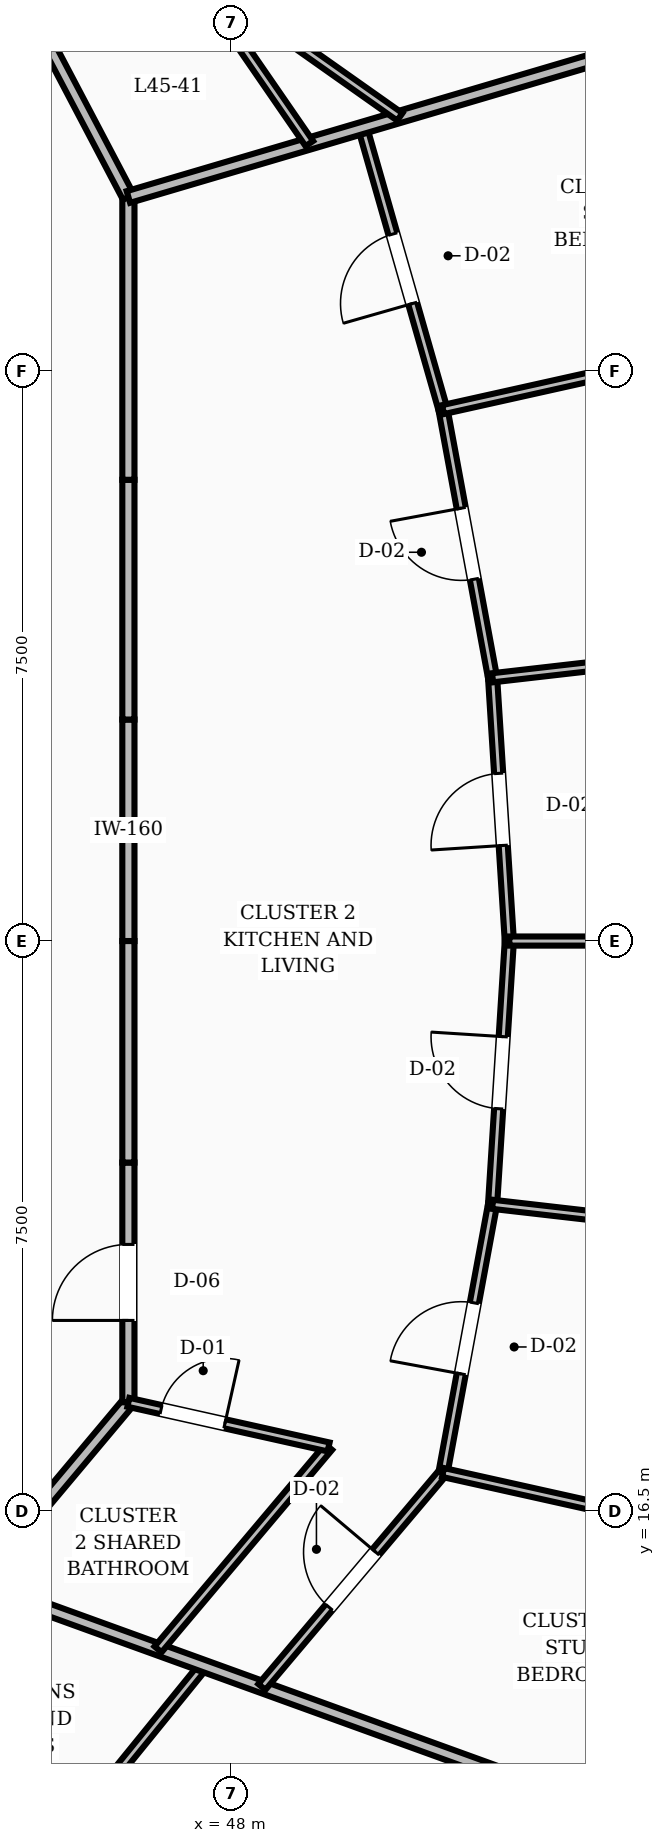
"""IFC4 building model, lengths in metres.
Left out: names, types, materials, properties, quantities, classifications, styles, units other than length and angle.
Written with IfcOpenShell. Run it as: python <this file> out.ifc"""

import sys

from ifc_helpers import new_model, si_unit, direction, frame, frame_2d, origin, place, context, subcontext, project, spatial, rectangle, extrude, element, fill, save


model = new_model("IFC4")
c1 = context("Model", 3, precision=1e-05, world=origin(), true_north=direction((0.0, 1.0)))
c2 = subcontext(c1, "Body", "Model", "MODEL_VIEW")
j1 = project(units=[si_unit("LENGTHUNIT", "METRE"), si_unit("PLANEANGLEUNIT", "RADIAN")], contexts=[c1])
p1 = place(None, origin())
s1 = spatial("IfcSite", under=j1, at=p1, CompositionType="ELEMENT")
p2 = place(p1, origin())
s2 = spatial("IfcBuilding", under=s1, at=p2, CompositionType="ELEMENT")
p3 = place(p2, frame((0.0, 0.0, 174.8)))
s3 = spatial("IfcBuildingStorey", under=s2, at=p3, CompositionType="ELEMENT", Elevation=174.8)
p4 = place(p3, frame((46.65, 24.0, 0.0), z_axis=(0.0, 0.0, 1.0), x_axis=(0.0, 1.0, 0.0)))
e1 = element("IfcWall", 1, at=p4, inside=s3, PredefinedType="SOLIDWALL", context=c2, shape_type="SweptSolid", body=[
    extrude(rectangle(XDim=2.914, YDim=0.16, at=frame_2d((1.457, 0.0))), origin(), (0.0, 0.0, 1.0), 2.8),
])
p5 = place(p3, frame((46.65, 26.914, 0.0), z_axis=(0.0, 0.0, 1.0), x_axis=(0.0, 1.0, 0.0)))
e2 = element("IfcWall", 2, at=p5, inside=s3, PredefinedType="SOLIDWALL", context=c2, shape_type="SweptSolid", body=[
    extrude(rectangle(XDim=3.154, YDim=0.16, at=frame_2d((1.577, 0.0))), origin(), (0.0, 0.0, 1.0), 2.8),
])
p6 = place(p3, frame((46.65, 30.068, 0.0), z_axis=(0.0, 0.0, 1.0), x_axis=(0.0, 1.0, 0.0)))
e3 = element("IfcWall", 3, at=p6, inside=s3, PredefinedType="SOLIDWALL", context=c2, shape_type="SweptSolid", body=[
    extrude(rectangle(XDim=3.721, YDim=0.16, at=frame_2d((1.86, 0.0))), origin(), (0.0, 0.0, 1.0), 2.8),
])
p7 = place(p3, frame((46.65, 33.789, 0.0), z_axis=(0.0, 0.0, 1.0), x_axis=(-0.46527115782, 0.885168204185, 0.0)))
e4 = element("IfcWall", 4, at=p7, inside=s3, PredefinedType="SOLIDWALL", context=c2, shape_type="SweptSolid", body=[
    extrude(rectangle(XDim=3.6, YDim=0.16, at=frame_2d((1.8, 0.0))), origin(), (0.0, 0.0, 1.0), 2.8),
])
p8 = place(p3, frame((44.65, 15.548, 0.0), z_axis=(0.0, 0.0, 1.0), x_axis=(0.642665742791, 0.76614668507, 0.0)))
e5 = element("IfcWall", 5, at=p8, inside=s3, PredefinedType="SOLIDWALL", context=c2, shape_type="SweptSolid", body=[
    extrude(rectangle(XDim=3.112, YDim=0.16, at=frame_2d((1.556, 0.0))), origin(), (0.0, 0.0, 1.0), 2.8),
])
p9 = place(p3, frame((46.65, 17.932, 0.0), z_axis=(0.0, 0.0, 1.0), x_axis=(0.0, 1.0, 0.0)))
e6 = element("IfcWall", 6, at=p9, inside=s3, PredefinedType="SOLIDWALL", context=c2, shape_type="SweptSolid", body=[
    extrude(rectangle(XDim=3.154, YDim=0.16, at=frame_2d((1.577, 0.0))), origin(), (0.0, 0.0, 1.0), 2.8),
])
p10 = place(p9, frame((1.077, 0.0, 0.0)))
e7 = element("IfcOpeningElement", 7, at=p10, cuts=e6, PredefinedType="OPENING", context=c2, shape_type="SweptSolid", body=[
    extrude(rectangle(XDim=1.0, YDim=2.1, at=frame_2d((0.5, 1.05))), frame((0.0, 0.09, 0.0), z_axis=(0.0, -1.0, 0.0), x_axis=(1.0, 0.0, 0.0)), (0.0, 0.0, 1.0), 0.18),
])
p11 = place(p3, frame((46.65, 21.086, 0.0), z_axis=(0.0, 0.0, 1.0), x_axis=(0.0, 1.0, 0.0)))
e8 = element("IfcWall", 8, at=p11, inside=s3, PredefinedType="SOLIDWALL", context=c2, shape_type="SweptSolid", body=[
    extrude(rectangle(XDim=2.914, YDim=0.16, at=frame_2d((1.457, 0.0))), origin(), (0.0, 0.0, 1.0), 2.8),
])
p12 = place(p3, frame((45.424, 11.74, 0.0), z_axis=(0.0, 0.0, 1.0), x_axis=(0.630511474319, 0.776179928079, 0.0)))
e9 = element("IfcWall", 9, at=p12, inside=s3, PredefinedType="PARTITIONING", context=c2, shape_type="SweptSolid", body=[
    extrude(rectangle(XDim=3.511, YDim=0.12, at=frame_2d((1.756, 0.0))), origin(), (0.0, 0.0, 1.0), 2.8),
])
p13 = place(p3, frame((44.65, 15.548, 0.0), z_axis=(0.0, 0.0, 1.0), x_axis=(0.940209575336, -0.340596468636, 0.0)))
e10 = element("IfcWall", 10, at=p13, inside=s3, PredefinedType="SOLIDWALL", context=c2, shape_type="SweptSolid", body=[
    extrude(rectangle(XDim=9.029, YDim=0.16, at=frame_2d((4.514, 0.0))), origin(), (0.0, 0.0, 1.0), 2.8),
])
p14 = place(p3, frame((47.04, 14.682, 0.0), z_axis=(0.0, 0.0, 1.0), x_axis=(0.644463857784, 0.764634772954, 0.0)))
e11 = element("IfcWall", 11, at=p14, inside=s3, PredefinedType="PARTITIONING", context=c2, shape_type="SweptSolid", body=[
    extrude(rectangle(XDim=3.482, YDim=0.12, at=frame_2d((1.741, 0.0))), origin(), (0.0, 0.0, 1.0), 2.8),
])
p15 = place(p3, frame((46.65, 17.932, 0.0), z_axis=(0.0, 0.0, 1.0), x_axis=(0.976010083103, -0.217725326231, 0.0)))
e12 = element("IfcWall", 12, at=p15, inside=s3, PredefinedType="PARTITIONING", context=c2, shape_type="SweptSolid", body=[
    extrude(rectangle(XDim=2.699, YDim=0.12, at=frame_2d((1.35, 0.0))), origin(), (0.0, 0.0, 1.0), 2.8),
])
p16 = place(p15, frame((0.44, 0.0, 0.0)))
e13 = element("IfcOpeningElement", 13, at=p16, cuts=e12, PredefinedType="OPENING", context=c2, shape_type="SweptSolid", body=[
    extrude(rectangle(XDim=0.86, YDim=2.1, at=frame_2d((0.43, 1.05))), frame((0.0, 0.07, 0.0), z_axis=(0.0, -1.0, 0.0), x_axis=(1.0, 0.0, 0.0)), (0.0, 0.0, 1.0), 0.14),
])
p17 = place(p3, frame((48.406, 14.187, 0.0), z_axis=(0.0, 0.0, 1.0), x_axis=(0.645325713634, 0.763907535846, 0.0)))
e14 = element("IfcWall", 14, at=p17, inside=s3, PredefinedType="PARTITIONING", context=c2, shape_type="SweptSolid", body=[
    extrude(rectangle(XDim=3.694, YDim=0.12, at=frame_2d((1.847, 0.0))), origin(), (0.0, 0.0, 1.0), 2.8),
])
p18 = place(p17, frame((1.372, 0.0, 0.0)))
e15 = element("IfcOpeningElement", 15, at=p18, cuts=e14, PredefinedType="OPENING", context=c2, shape_type="SweptSolid", body=[
    extrude(rectangle(XDim=0.95, YDim=2.1, at=frame_2d((0.475, 1.05))), frame((0.0, 0.07, 0.0), z_axis=(0.0, -1.0, 0.0), x_axis=(1.0, 0.0, 0.0)), (0.0, 0.0, 1.0), 0.14),
])
p19 = place(p3, frame((50.789, 17.009, 0.0), z_axis=(0.0, 0.0, 1.0), x_axis=(0.18176514898, 0.983341970332, 0.0)))
e16 = element("IfcWall", 16, at=p19, inside=s3, PredefinedType="PARTITIONING", context=c2, shape_type="SweptSolid", body=[
    extrude(rectangle(XDim=3.588, YDim=0.12, at=frame_2d((1.794, 0.0))), origin(), (0.0, 0.0, 1.0), 2.8),
])
p20 = place(p19, frame((1.319, 0.0, 0.0)))
e17 = element("IfcOpeningElement", 17, at=p20, cuts=e16, PredefinedType="OPENING", context=c2, shape_type="SweptSolid", body=[
    extrude(rectangle(XDim=0.95, YDim=2.1, at=frame_2d((0.475, 1.05))), frame((0.0, 0.07, 0.0), z_axis=(0.0, -1.0, 0.0), x_axis=(1.0, 0.0, 0.0)), (0.0, 0.0, 1.0), 0.14),
])
p21 = place(p3, frame((50.789, 17.009, 0.0), z_axis=(0.0, 0.0, 1.0), x_axis=(0.976023513378, -0.217665112806, 0.0)))
e18 = element("IfcWall", 18, at=p21, inside=s3, PredefinedType="PARTITIONING", context=c2, shape_type="SweptSolid", body=[
    extrude(rectangle(XDim=5.348, YDim=0.12, at=frame_2d((2.674, 0.0))), origin(), (0.0, 0.0, 1.0), 2.8),
])
p22 = place(p3, frame((51.441, 20.536, 0.0), z_axis=(0.0, 0.0, 1.0), x_axis=(0.063451217103, 0.997984941293, 0.0)))
e19 = element("IfcWall", 19, at=p22, inside=s3, PredefinedType="PARTITIONING", context=c2, shape_type="SweptSolid", body=[
    extrude(rectangle(XDim=3.471, YDim=0.12, at=frame_2d((1.735, 0.0))), origin(), (0.0, 0.0, 1.0), 2.8),
])
p23 = place(p22, frame((1.26, 0.0, 0.0)))
e20 = element("IfcOpeningElement", 20, at=p23, cuts=e19, PredefinedType="OPENING", context=c2, shape_type="SweptSolid", body=[
    extrude(rectangle(XDim=0.95, YDim=2.1, at=frame_2d((0.475, 1.05))), frame((0.0, 0.07, 0.0), z_axis=(0.0, -1.0, 0.0), x_axis=(1.0, 0.0, 0.0)), (0.0, 0.0, 1.0), 0.14),
])
p24 = place(p3, frame((51.441, 20.536, 0.0), z_axis=(0.0, 0.0, 1.0), x_axis=(0.993484761462, -0.11396503298, 0.0)))
e21 = element("IfcWall", 21, at=p24, inside=s3, PredefinedType="PARTITIONING", context=c2, shape_type="SweptSolid", body=[
    extrude(rectangle(XDim=6.088, YDim=0.12, at=frame_2d((3.044, 0.0))), origin(), (0.0, 0.0, 1.0), 2.8),
])
p25 = place(p3, frame((51.662, 24.0, 0.0), z_axis=(0.0, 0.0, 1.0), x_axis=(-0.063451217103, 0.997984941293, 0.0)))
e22 = element("IfcWall", 22, at=p25, inside=s3, PredefinedType="PARTITIONING", context=c2, shape_type="SweptSolid", body=[
    extrude(rectangle(XDim=3.471, YDim=0.12, at=frame_2d((1.735, 0.0))), origin(), (0.0, 0.0, 1.0), 2.8),
])
p26 = place(p25, frame((1.26, 0.0, 0.0)))
e23 = element("IfcOpeningElement", 23, at=p26, cuts=e22, PredefinedType="OPENING", context=c2, shape_type="SweptSolid", body=[
    extrude(rectangle(XDim=0.95, YDim=2.1, at=frame_2d((0.475, 1.05))), frame((0.0, 0.07, 0.0), z_axis=(0.0, -1.0, 0.0), x_axis=(1.0, 0.0, 0.0)), (0.0, 0.0, 1.0), 0.14),
])
p27 = place(p3, frame((51.662, 24.0, 0.0), z_axis=(0.0, 0.0, 1.0), x_axis=(1.0, 0.0, 0.0)))
e24 = element("IfcWall", 24, at=p27, inside=s3, PredefinedType="PARTITIONING", context=c2, shape_type="SweptSolid", body=[
    extrude(rectangle(XDim=6.328, YDim=0.12, at=frame_2d((3.164, 0.0))), origin(), (0.0, 0.0, 1.0), 2.8),
])
p28 = place(p3, frame((51.441, 27.464, 0.0), z_axis=(0.0, 0.0, 1.0), x_axis=(-0.18176514898, 0.983341970332, 0.0)))
e25 = element("IfcWall", 25, at=p28, inside=s3, PredefinedType="PARTITIONING", context=c2, shape_type="SweptSolid", body=[
    extrude(rectangle(XDim=3.588, YDim=0.12, at=frame_2d((1.794, 0.0))), origin(), (0.0, 0.0, 1.0), 2.8),
])
p29 = place(p28, frame((1.319, 0.0, 0.0)))
e26 = element("IfcOpeningElement", 26, at=p29, cuts=e25, PredefinedType="OPENING", context=c2, shape_type="SweptSolid", body=[
    extrude(rectangle(XDim=0.95, YDim=2.1, at=frame_2d((0.475, 1.05))), frame((0.0, 0.07, 0.0), z_axis=(0.0, -1.0, 0.0), x_axis=(1.0, 0.0, 0.0)), (0.0, 0.0, 1.0), 0.14),
])
p30 = place(p3, frame((51.441, 27.464, 0.0), z_axis=(0.0, 0.0, 1.0), x_axis=(0.993484761462, 0.11396503298, 0.0)))
e27 = element("IfcWall", 27, at=p30, inside=s3, PredefinedType="PARTITIONING", context=c2, shape_type="SweptSolid", body=[
    extrude(rectangle(XDim=6.088, YDim=0.12, at=frame_2d((3.044, 0.0))), origin(), (0.0, 0.0, 1.0), 2.8),
])
p31 = place(p3, frame((50.789, 30.991, 0.0), z_axis=(0.0, 0.0, 1.0), x_axis=(-0.274604022912, 0.961557398495, 0.0)))
e28 = element("IfcWall", 28, at=p31, inside=s3, PredefinedType="PARTITIONING", context=c2, shape_type="SweptSolid", body=[
    extrude(rectangle(XDim=3.855, YDim=0.12, at=frame_2d((1.927, 0.0))), origin(), (0.0, 0.0, 1.0), 2.8),
])
p32 = place(p31, frame((1.452, 0.0, 0.0)))
e29 = element("IfcOpeningElement", 29, at=p32, cuts=e28, PredefinedType="OPENING", context=c2, shape_type="SweptSolid", body=[
    extrude(rectangle(XDim=0.95, YDim=2.1, at=frame_2d((0.475, 1.05))), frame((0.0, 0.07, 0.0), z_axis=(0.0, -1.0, 0.0), x_axis=(1.0, 0.0, 0.0)), (0.0, 0.0, 1.0), 0.14),
])
p33 = place(p3, frame((50.789, 30.991, 0.0), z_axis=(0.0, 0.0, 1.0), x_axis=(0.976023513378, 0.217665112806, 0.0)))
e30 = element("IfcWall", 30, at=p33, inside=s3, PredefinedType="PARTITIONING", context=c2, shape_type="SweptSolid", body=[
    extrude(rectangle(XDim=5.348, YDim=0.12, at=frame_2d((2.674, 0.0))), origin(), (0.0, 0.0, 1.0), 2.8),
])
p34 = place(p3, frame((46.65, 33.789, 0.0), z_axis=(0.0, 0.0, 1.0), x_axis=(0.959073837525, 0.283156095069, 0.0)))
e31 = element("IfcWall", 31, at=p34, inside=s3, PredefinedType="SOLIDWALL", context=c2, shape_type="SweptSolid", body=[
    extrude(rectangle(XDim=7.25, YDim=0.16, at=frame_2d((3.625, 0.0))), origin(), (0.0, 0.0, 1.0), 2.8),
])
p35 = place(p3, frame((49.031, 34.492, 0.0), z_axis=(0.0, 0.0, 1.0), x_axis=(-0.567383758206, 0.823453502588, 0.0)))
e32 = element("IfcWall", 32, at=p35, inside=s3, PredefinedType="PARTITIONING", context=c2, shape_type="SweptSolid", body=[
    extrude(rectangle(XDim=3.889, YDim=0.12, at=frame_2d((1.944, 0.0))), origin(), (0.0, 0.0, 1.0), 2.8),
])
p36 = place(p3, frame((50.221, 34.843, 0.0), z_axis=(0.0, 0.0, 1.0), x_axis=(-0.817010879992, 0.57662225241, 0.0)))
e33 = element("IfcWall", 33, at=p36, inside=s3, PredefinedType="PARTITIONING", context=c2, shape_type="SweptSolid", body=[
    extrude(rectangle(XDim=8.021, YDim=0.12, at=frame_2d((4.011, 0.0))), origin(), (0.0, 0.0, 1.0), 2.8),
])
p37 = place(p36, frame((4.898, 0.0, 0.0)))
e34 = element("IfcOpeningElement", 34, at=p37, cuts=e33, PredefinedType="OPENING", context=c2, shape_type="SweptSolid", body=[
    extrude(rectangle(XDim=0.95, YDim=2.1, at=frame_2d((0.475, 1.05))), frame((0.0, 0.07, 0.0), z_axis=(0.0, -1.0, 0.0), x_axis=(1.0, 0.0, 0.0)), (0.0, 0.0, 1.0), 0.14),
])
p38 = place(p16, origin())
e35 = element("IfcDoor", 35, at=p38, inside=s3, OperationType="SINGLE_SWING_RIGHT", PredefinedType="DOOR", context=c2, shape_type="SweptSolid", body=[
    extrude(rectangle(XDim=0.86, YDim=2.1, at=frame_2d((0.43, 1.05))), frame((0.0, 0.025, 0.0), z_axis=(0.0, -1.0, 0.0), x_axis=(1.0, 0.0, 0.0)), (0.0, 0.0, 1.0), 0.05),
])
fill(e13, e35)
p39 = place(p10, origin())
e36 = element("IfcDoor", 36, at=p39, inside=s3, OperationType="SINGLE_SWING_LEFT", PredefinedType="DOOR", context=c2, shape_type="SweptSolid", body=[
    extrude(rectangle(XDim=1.0, YDim=2.1, at=frame_2d((0.5, 1.05))), frame((0.0, 0.025, 0.0), z_axis=(0.0, -1.0, 0.0), x_axis=(1.0, 0.0, 0.0)), (0.0, 0.0, 1.0), 0.05),
])
fill(e7, e36)
p40 = place(p18, origin())
e37 = element("IfcDoor", 37, at=p40, inside=s3, OperationType="SINGLE_SWING_RIGHT", PredefinedType="DOOR", context=c2, shape_type="SweptSolid", body=[
    extrude(rectangle(XDim=0.95, YDim=2.1, at=frame_2d((0.475, 1.05))), frame((0.0, 0.025, 0.0), z_axis=(0.0, -1.0, 0.0), x_axis=(1.0, 0.0, 0.0)), (0.0, 0.0, 1.0), 0.05),
])
fill(e15, e37)
p41 = place(p20, origin())
e38 = element("IfcDoor", 38, at=p41, inside=s3, OperationType="SINGLE_SWING_LEFT", PredefinedType="DOOR", context=c2, shape_type="SweptSolid", body=[
    extrude(rectangle(XDim=0.95, YDim=2.1, at=frame_2d((0.475, 1.05))), frame((0.0, 0.025, 0.0), z_axis=(0.0, -1.0, 0.0), x_axis=(1.0, 0.0, 0.0)), (0.0, 0.0, 1.0), 0.05),
])
fill(e17, e38)
p42 = place(p23, origin())
e39 = element("IfcDoor", 39, at=p42, inside=s3, OperationType="SINGLE_SWING_RIGHT", PredefinedType="DOOR", context=c2, shape_type="SweptSolid", body=[
    extrude(rectangle(XDim=0.95, YDim=2.1, at=frame_2d((0.475, 1.05))), frame((0.0, 0.025, 0.0), z_axis=(0.0, -1.0, 0.0), x_axis=(1.0, 0.0, 0.0)), (0.0, 0.0, 1.0), 0.05),
])
fill(e20, e39)
p43 = place(p26, origin())
e40 = element("IfcDoor", 40, at=p43, inside=s3, OperationType="SINGLE_SWING_LEFT", PredefinedType="DOOR", context=c2, shape_type="SweptSolid", body=[
    extrude(rectangle(XDim=0.95, YDim=2.1, at=frame_2d((0.475, 1.05))), frame((0.0, 0.025, 0.0), z_axis=(0.0, -1.0, 0.0), x_axis=(1.0, 0.0, 0.0)), (0.0, 0.0, 1.0), 0.05),
])
fill(e23, e40)
p44 = place(p29, origin())
e41 = element("IfcDoor", 41, at=p44, inside=s3, OperationType="SINGLE_SWING_RIGHT", PredefinedType="DOOR", context=c2, shape_type="SweptSolid", body=[
    extrude(rectangle(XDim=0.95, YDim=2.1, at=frame_2d((0.475, 1.05))), frame((0.0, 0.025, 0.0), z_axis=(0.0, -1.0, 0.0), x_axis=(1.0, 0.0, 0.0)), (0.0, 0.0, 1.0), 0.05),
])
fill(e26, e41)
p45 = place(p32, origin())
e42 = element("IfcDoor", 42, at=p45, inside=s3, OperationType="SINGLE_SWING_LEFT", PredefinedType="DOOR", context=c2, shape_type="SweptSolid", body=[
    extrude(rectangle(XDim=0.95, YDim=2.1, at=frame_2d((0.475, 1.05))), frame((0.0, 0.025, 0.0), z_axis=(0.0, -1.0, 0.0), x_axis=(1.0, 0.0, 0.0)), (0.0, 0.0, 1.0), 0.05),
])
fill(e29, e42)
save(model, sys.argv[1])
